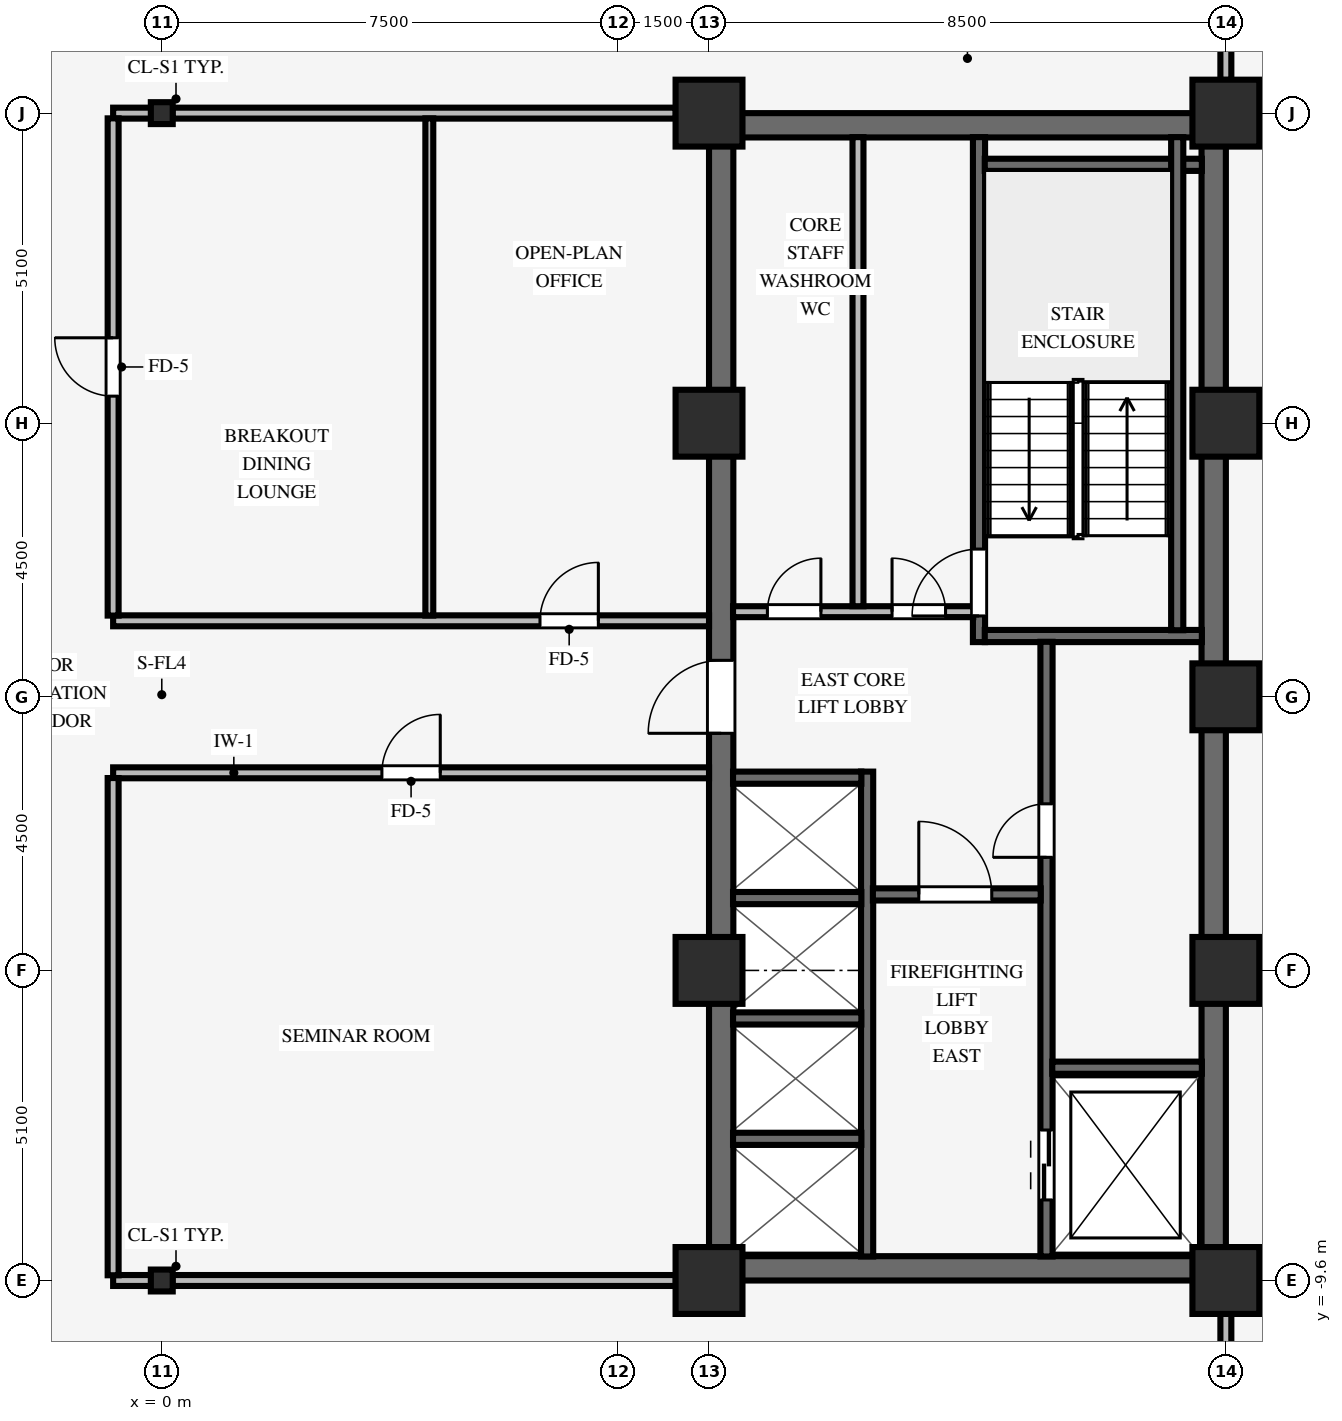
"""IFC4 building model, lengths in metres.
Left out: names, types, materials, properties, quantities, classifications, styles, units other than length and angle.
Written with IfcOpenShell. Run it as: python <this file> out.ifc"""

import sys

from ifc_helpers import new_model, si_unit, direction, frame, frame_2d, origin, origin_2d, place, context, subcontext, project, spatial, rectangle, i_section, extrude, source, transform, mapped, element, fill, save


model = new_model("IFC4")
c1 = context("Model", 3, precision=1e-05, world=origin(), true_north=direction((0.0, 1.0)))
c2 = subcontext(c1, "Body", "Model", "MODEL_VIEW")
j1 = project(units=[si_unit("LENGTHUNIT", "METRE"), si_unit("PLANEANGLEUNIT", "RADIAN")], contexts=[c1])
p1 = place(None, origin())
s1 = spatial("IfcSite", under=j1, at=p1, CompositionType="ELEMENT")
p2 = place(p1, origin())
s2 = spatial("IfcBuilding", under=s1, at=p2, CompositionType="ELEMENT")
p3 = place(p2, frame((0.0, 0.0, 105.6)))
s3 = spatial("IfcBuildingStorey", under=s2, at=p3, CompositionType="ELEMENT", Elevation=105.6)
for number, where, z_axis, x_axis in (
    (1, (9.0, -9.4, 0.0), (0.0, 0.0, 1.0), (1.0, 0.0, 0.0)),
    (2, (9.0, 9.4, 0.0), (0.0, 0.0, 1.0), (1.0, 0.0, 0.0)),
):
    element("IfcWall", number, at=place(p3, frame(where, z_axis=z_axis, x_axis=x_axis)), inside=s3, PredefinedType="SHEAR", context=c2, shape_type="SweptSolid", body=[
        extrude(rectangle(XDim=8.5, YDim=0.4, at=frame_2d((4.25, 0.0))), origin(), (0.0, 0.0, 1.0), 3.37),
    ])
p4 = place(p3, frame((9.2, -9.205, 0.0), z_axis=(0.0, 0.0, 1.0), x_axis=(0.0, 1.0, 0.0)))
e3 = element("IfcWall", 3, at=p4, inside=s3, PredefinedType="SHEAR", context=c2, shape_type="SweptSolid", body=[
    extrude(rectangle(XDim=18.41, YDim=0.4, at=frame_2d((9.205, 0.0))), origin(), (0.0, 0.0, 1.0), 3.37),
])
p5 = place(p4, frame((8.605, 0.0, 0.0)))
e4 = element("IfcOpeningElement", 4, at=p5, cuts=e3, PredefinedType="OPENING", context=c2, shape_type="SweptSolid", body=[
    extrude(rectangle(XDim=1.2, YDim=2.15, at=frame_2d((0.6, 1.075))), frame((0.0, 0.21, 0.0), z_axis=(0.0, -1.0, 0.0), x_axis=(1.0, 0.0, 0.0)), (0.0, 0.0, 1.0), 0.42),
])
p6 = place(p3, frame((17.3, -9.205, 0.0), z_axis=(0.0, 0.0, 1.0), x_axis=(0.0, 1.0, 0.0)))
e5 = element("IfcWall", 5, at=p6, inside=s3, PredefinedType="SHEAR", context=c2, shape_type="SweptSolid", body=[
    extrude(rectangle(XDim=18.41, YDim=0.4, at=frame_2d((9.205, 0.0))), origin(), (0.0, 0.0, 1.0), 3.37),
])
for number, where, z_axis, x_axis in (
    (6, (9.0, -9.6, 0.0), (0.0, 0.0, 1.0), (1.0, 0.0, 0.0)),
    (7, (9.0, -4.5, 0.0), (0.0, 0.0, 1.0), (1.0, 0.0, 0.0)),
    (8, (9.0, 4.5, 0.0), (0.0, 0.0, 1.0), (1.0, 0.0, 0.0)),
    (9, (9.0, 9.6, 0.0), (0.0, 0.0, 1.0), (1.0, 0.0, 0.0)),
    (10, (17.5, -9.6, 0.0), (0.0, 0.0, 1.0), (1.0, 0.0, 0.0)),
    (11, (17.5, -4.5, 0.0), (0.0, 0.0, 1.0), (1.0, 0.0, 0.0)),
    (12, (17.5, 4.5, 0.0), (0.0, 0.0, 1.0), (1.0, 0.0, 0.0)),
    (13, (17.5, 9.6, 0.0), (0.0, 0.0, 1.0), (1.0, 0.0, 0.0)),
    (14, (17.5, 0.0, 0.0), (0.0, 0.0, 1.0), (1.0, 0.0, 0.0)),
):
    element("IfcColumn", number, at=place(p3, frame(where, z_axis=z_axis, x_axis=x_axis)), inside=s3, PredefinedType="COLUMN", context=c2, shape_type="SweptSolid", body=[
        extrude(rectangle(XDim=1.1, YDim=1.1, at=origin_2d()), origin(), (0.0, 0.0, 1.0), 3.37),
    ])
for number, where, z_axis, x_axis in (
    (15, (0.0, -9.6, 0.0), (0.0, 0.0, 1.0), (1.0, 0.0, 0.0)),
    (16, (0.0, 9.6, 0.0), (0.0, 0.0, 1.0), (1.0, 0.0, 0.0)),
):
    element("IfcColumn", number, at=place(p3, frame(where, z_axis=z_axis, x_axis=x_axis)), inside=s3, PredefinedType="COLUMN", context=c2, shape_type="SweptSolid", body=[
        extrude(i_section(OverallWidth=0.36, OverallDepth=0.36, WebThickness=0.021, FlangeThickness=0.021, FilletRadius=0.018, at=origin_2d()), origin(), (0.0, 0.0, 1.0), 3.37),
    ])
p7 = place(p3, frame((13.44, 0.9, 0.0), z_axis=(0.0, 0.0, 1.0), x_axis=(0.0, 1.0, 0.0)))
e17 = element("IfcWall", 17, at=p7, inside=s3, PredefinedType="SHEAR", context=c2, shape_type="SweptSolid", body=[
    extrude(rectangle(XDim=8.305, YDim=0.2, at=frame_2d((4.153, 0.0))), origin(), (0.0, 0.0, 1.0), 3.37),
])
p8 = place(p7, frame((0.43, 0.0, 0.0)))
e18 = element("IfcOpeningElement", 18, at=p8, cuts=e17, PredefinedType="OPENING", context=c2, shape_type="SweptSolid", body=[
    extrude(rectangle(XDim=1.1, YDim=2.15, at=frame_2d((0.55, 1.075))), frame((0.0, 0.11, 0.0), z_axis=(0.0, -1.0, 0.0), x_axis=(1.0, 0.0, 0.0)), (0.0, 0.0, 1.0), 0.22),
])
for number, where, z_axis, x_axis in (
    (19, (13.535, 1.0, 0.0), (0.0, 0.0, 1.0), (1.0, 0.0, 0.0)),
    (20, (13.535, 8.75, 0.0), (0.0, 0.0, 1.0), (1.0, 0.0, 0.0)),
):
    element("IfcWall", number, at=place(p3, frame(where, z_axis=z_axis, x_axis=x_axis)), inside=s3, PredefinedType="SHEAR", context=c2, shape_type="SweptSolid", body=[
        extrude(rectangle(XDim=3.57, YDim=0.2, at=frame_2d((1.785, 0.0))), origin(), (0.0, 0.0, 1.0), 3.37),
    ])
p9 = place(p3, frame((16.7, 1.095, 0.0), z_axis=(0.0, 0.0, 1.0), x_axis=(0.0, 1.0, 0.0)))
e21 = element("IfcWall", 21, at=p9, inside=s3, PredefinedType="SHEAR", context=c2, shape_type="SweptSolid", body=[
    extrude(rectangle(XDim=8.11, YDim=0.2, at=frame_2d((4.055, 0.0))), origin(), (0.0, 0.0, 1.0), 3.37),
])
p10 = place(p3, frame((14.55, -9.205, 0.0), z_axis=(0.0, 0.0, 1.0), x_axis=(0.0, 1.0, 0.0)))
e22 = element("IfcWall", 22, at=p10, inside=s3, PredefinedType="SHEAR", context=c2, shape_type="SweptSolid", body=[
    extrude(rectangle(XDim=10.11, YDim=0.2, at=frame_2d((5.055, 0.0))), origin(), (0.0, 0.0, 1.0), 3.37),
])
p11 = place(p10, frame((6.565, 0.0, 0.0)))
e23 = element("IfcOpeningElement", 23, at=p11, cuts=e22, PredefinedType="OPENING", context=c2, shape_type="SweptSolid", body=[
    extrude(rectangle(XDim=0.88, YDim=2.1, at=frame_2d((0.44, 1.05))), frame((0.0, 0.11, 0.0), z_axis=(0.0, -1.0, 0.0), x_axis=(1.0, 0.0, 0.0)), (0.0, 0.0, 1.0), 0.22),
])
p12 = place(p10, frame((0.93, 0.0, 0.0)))
e24 = element("IfcOpeningElement", 24, at=p12, cuts=e22, PredefinedType="OPENING", context=c2, shape_type="SweptSolid", body=[
    extrude(rectangle(XDim=1.15, YDim=2.15, at=frame_2d((0.575, 1.075))), frame((0.0, 0.11, 0.0), z_axis=(0.0, -1.0, 0.0), x_axis=(1.0, 0.0, 0.0)), (0.0, 0.0, 1.0), 0.22),
])
p13 = place(p3, frame((14.645, -6.1, 0.0), z_axis=(0.0, 0.0, 1.0), x_axis=(1.0, 0.0, 0.0)))
e25 = element("IfcWall", 25, at=p13, inside=s3, PredefinedType="SHEAR", context=c2, shape_type="SweptSolid", body=[
    extrude(rectangle(XDim=2.46, YDim=0.2, at=frame_2d((1.23, 0.0))), origin(), (0.0, 0.0, 1.0), 3.37),
])
p14 = place(p3, frame((11.6, -9.205, 0.0), z_axis=(0.0, 0.0, 1.0), x_axis=(0.0, 1.0, 0.0)))
e26 = element("IfcWall", 26, at=p14, inside=s3, PredefinedType="SHEAR", context=c2, shape_type="SweptSolid", body=[
    extrude(rectangle(XDim=7.975, YDim=0.2, at=frame_2d((3.988, 0.0))), origin(), (0.0, 0.0, 1.0), 3.37),
])
p15 = place(p3, frame((11.695, -3.25, 0.0), z_axis=(0.0, 0.0, 1.0), x_axis=(1.0, 0.0, 0.0)))
e27 = element("IfcWall", 27, at=p15, inside=s3, PredefinedType="SHEAR", context=c2, shape_type="SweptSolid", body=[
    extrude(rectangle(XDim=2.76, YDim=0.2, at=frame_2d((1.38, 0.0))), origin(), (0.0, 0.0, 1.0), 3.37),
])
p16 = place(p15, frame((0.755, 0.0, 0.0)))
e28 = element("IfcOpeningElement", 28, at=p16, cuts=e27, PredefinedType="OPENING", context=c2, shape_type="SweptSolid", body=[
    extrude(rectangle(XDim=1.2, YDim=2.15, at=frame_2d((0.6, 1.075))), frame((0.0, 0.11, 0.0), z_axis=(0.0, -1.0, 0.0), x_axis=(1.0, 0.0, 0.0)), (0.0, 0.0, 1.0), 0.22),
])
for number, where, z_axis, x_axis in (
    (29, (9.395, -7.27, 0.0), (0.0, 0.0, 1.0), (1.0, 0.0, 0.0)),
    (30, (9.395, -5.29, 0.0), (0.0, 0.0, 1.0), (1.0, 0.0, 0.0)),
    (31, (9.395, -3.31, 0.0), (0.0, 0.0, 1.0), (1.0, 0.0, 0.0)),
    (32, (9.395, -1.33, 0.0), (0.0, 0.0, 1.0), (1.0, 0.0, 0.0)),
):
    element("IfcWall", number, at=place(p3, frame(where, z_axis=z_axis, x_axis=x_axis)), inside=s3, PredefinedType="SHEAR", context=c2, shape_type="SweptSolid", body=[
        extrude(rectangle(XDim=2.11, YDim=0.2, at=frame_2d((1.055, 0.0))), origin(), (0.0, 0.0, 1.0), 3.37),
    ])
p17 = place(p3, frame((9.395, 1.4, 0.0), z_axis=(0.0, 0.0, 1.0), x_axis=(1.0, 0.0, 0.0)))
e33 = element("IfcWall", 33, at=p17, inside=s3, PredefinedType="PARTITIONING", context=c2, shape_type="SweptSolid", body=[
    extrude(rectangle(XDim=3.95, YDim=0.18, at=frame_2d((1.975, 0.0))), origin(), (0.0, 0.0, 1.0), 3.36),
])
p18 = place(p17, frame((0.565, 0.0, 0.0)))
e34 = element("IfcOpeningElement", 34, at=p18, cuts=e33, PredefinedType="OPENING", context=c2, shape_type="SweptSolid", body=[
    extrude(rectangle(XDim=0.88, YDim=2.1, at=frame_2d((0.44, 1.05))), frame((0.0, 0.1, 0.0), z_axis=(0.0, -1.0, 0.0), x_axis=(1.0, 0.0, 0.0)), (0.0, 0.0, 1.0), 0.2),
])
p19 = place(p17, frame((2.615, 0.0, 0.0)))
e35 = element("IfcOpeningElement", 35, at=p19, cuts=e33, PredefinedType="OPENING", context=c2, shape_type="SweptSolid", body=[
    extrude(rectangle(XDim=0.88, YDim=2.1, at=frame_2d((0.44, 1.05))), frame((0.0, 0.1, 0.0), z_axis=(0.0, -1.0, 0.0), x_axis=(1.0, 0.0, 0.0)), (0.0, 0.0, 1.0), 0.2),
])
p20 = place(p3, frame((11.45, 1.49, 0.0), z_axis=(0.0, 0.0, 1.0), x_axis=(0.0, 1.0, 0.0)))
e36 = element("IfcWall", 36, at=p20, inside=s3, PredefinedType="PARTITIONING", context=c2, shape_type="SweptSolid", body=[
    extrude(rectangle(XDim=7.715, YDim=0.18, at=frame_2d((3.857, 0.0))), origin(), (0.0, 0.0, 1.0), 3.36),
])
p21 = place(p3, frame((-0.8, -9.6, 0.0), z_axis=(0.0, 0.0, 1.0), x_axis=(1.0, 0.0, 0.0)))
e37 = element("IfcWall", 37, at=p21, inside=s3, PredefinedType="PARTITIONING", context=c2, shape_type="SweptSolid", body=[
    extrude(rectangle(XDim=0.624, YDim=0.18, at=frame_2d((0.312, 0.0))), origin(), (0.0, 0.0, 1.0), 2.405),
])
p22 = place(p3, frame((0.176, -9.6, 0.0), z_axis=(0.0, 0.0, 1.0), x_axis=(1.0, 0.0, 0.0)))
e38 = element("IfcWall", 38, at=p22, inside=s3, PredefinedType="PARTITIONING", context=c2, shape_type="SweptSolid", body=[
    extrude(rectangle(XDim=8.278, YDim=0.18, at=frame_2d((4.139, 0.0))), origin(), (0.0, 0.0, 1.0), 2.405),
])
p23 = place(p3, frame((-0.8, -1.25, 0.0), z_axis=(0.0, 0.0, 1.0), x_axis=(1.0, 0.0, 0.0)))
e39 = element("IfcWall", 39, at=p23, inside=s3, PredefinedType="PARTITIONING", context=c2, shape_type="SweptSolid", body=[
    extrude(rectangle(XDim=9.8, YDim=0.18, at=frame_2d((4.9, 0.0))), origin(), (0.0, 0.0, 1.0), 3.36),
])
p24 = place(p23, frame((4.42, 0.0, 0.0)))
e40 = element("IfcOpeningElement", 40, at=p24, cuts=e39, PredefinedType="OPENING", context=c2, shape_type="SweptSolid", body=[
    extrude(rectangle(XDim=0.96, YDim=2.1, at=frame_2d((0.48, 1.05))), frame((0.0, 0.1, 0.0), z_axis=(0.0, -1.0, 0.0), x_axis=(1.0, 0.0, 0.0)), (0.0, 0.0, 1.0), 0.2),
])
p25 = place(p3, frame((-0.8, 1.25, 0.0), z_axis=(0.0, 0.0, 1.0), x_axis=(1.0, 0.0, 0.0)))
e41 = element("IfcWall", 41, at=p25, inside=s3, PredefinedType="PARTITIONING", context=c2, shape_type="SweptSolid", body=[
    extrude(rectangle(XDim=9.8, YDim=0.18, at=frame_2d((4.9, 0.0))), origin(), (0.0, 0.0, 1.0), 3.36),
])
p26 = place(p25, frame((7.02, 0.0, 0.0)))
e42 = element("IfcOpeningElement", 42, at=p26, cuts=e41, PredefinedType="OPENING", context=c2, shape_type="SweptSolid", body=[
    extrude(rectangle(XDim=0.96, YDim=2.1, at=frame_2d((0.48, 1.05))), frame((0.0, 0.1, 0.0), z_axis=(0.0, -1.0, 0.0), x_axis=(1.0, 0.0, 0.0)), (0.0, 0.0, 1.0), 0.2),
])
p27 = place(p3, frame((-0.8, 9.6, 0.0), z_axis=(0.0, 0.0, 1.0), x_axis=(1.0, 0.0, 0.0)))
e43 = element("IfcWall", 43, at=p27, inside=s3, PredefinedType="PARTITIONING", context=c2, shape_type="SweptSolid", body=[
    extrude(rectangle(XDim=0.624, YDim=0.18, at=frame_2d((0.312, 0.0))), origin(), (0.0, 0.0, 1.0), 2.405),
])
p28 = place(p3, frame((0.176, 9.6, 0.0), z_axis=(0.0, 0.0, 1.0), x_axis=(1.0, 0.0, 0.0)))
e44 = element("IfcWall", 44, at=p28, inside=s3, PredefinedType="PARTITIONING", context=c2, shape_type="SweptSolid", body=[
    extrude(rectangle(XDim=8.278, YDim=0.18, at=frame_2d((4.139, 0.0))), origin(), (0.0, 0.0, 1.0), 2.405),
])
p29 = place(p3, frame((-0.8, -9.514, 0.0), z_axis=(0.0, 0.0, 1.0), x_axis=(0.0, 1.0, 0.0)))
e45 = element("IfcWall", 45, at=p29, inside=s3, PredefinedType="PARTITIONING", context=c2, shape_type="SweptSolid", body=[
    extrude(rectangle(XDim=8.178, YDim=0.18, at=frame_2d((4.089, 0.0))), origin(), (0.0, 0.0, 1.0), 3.36),
])
p30 = place(p3, frame((-0.8, 1.336, 0.0), z_axis=(0.0, 0.0, 1.0), x_axis=(0.0, 1.0, 0.0)))
e46 = element("IfcWall", 46, at=p30, inside=s3, PredefinedType="PARTITIONING", context=c2, shape_type="SweptSolid", body=[
    extrude(rectangle(XDim=8.178, YDim=0.18, at=frame_2d((4.089, 0.0))), origin(), (0.0, 0.0, 1.0), 3.36),
])
p31 = place(p30, frame((3.609, 0.0, 0.0)))
e47 = element("IfcOpeningElement", 47, at=p31, cuts=e46, PredefinedType="OPENING", context=c2, shape_type="SweptSolid", body=[
    extrude(rectangle(XDim=0.96, YDim=2.1, at=frame_2d((0.48, 1.05))), frame((0.0, 0.1, 0.0), z_axis=(0.0, -1.0, 0.0), x_axis=(1.0, 0.0, 0.0)), (0.0, 0.0, 1.0), 0.2),
])
p32 = place(p3, frame((4.4, 1.336, 0.0), z_axis=(0.0, 0.0, 1.0), x_axis=(0.0, 1.0, 0.0)))
e48 = element("IfcWall", 48, at=p32, inside=s3, PredefinedType="PARTITIONING", context=c2, shape_type="SweptSolid", body=[
    extrude(rectangle(XDim=8.178, YDim=0.13, at=frame_2d((4.089, 0.0))), origin(), (0.0, 0.0, 1.0), 3.36),
])
for number, where, z_axis, x_axis in (
    (49, (17.5, -11.114, 0.0), (0.0, 0.0, 1.0), (0.0, 1.0, 0.0)),
    (50, (17.5, 10.146, 0.0), (0.0, 0.0, 1.0), (0.0, 1.0, 0.0)),
):
    element("IfcWall", number, at=place(p3, frame(where, z_axis=z_axis, x_axis=x_axis)), inside=s3, PredefinedType="PARTITIONING", context=c2, shape_type="SweptSolid", body=[
        extrude(rectangle(XDim=0.968, YDim=0.18, at=frame_2d((0.484, 0.0))), origin(), (0.0, 0.0, 1.0), 2.738),
    ])
m1 = source(origin(), c2, "Body", "SweptSolid", [
    extrude(rectangle(XDim=1.1, YDim=2.15, at=frame_2d((0.55, 1.075))), frame((0.0, 0.025, 0.0), z_axis=(0.0, -1.0, 0.0), x_axis=(1.0, 0.0, 0.0)), (0.0, 0.0, 1.0), 0.05),
])
p33 = place(p8, origin())
e51 = element("IfcDoor", 51, at=p33, inside=s3, OperationType="SINGLE_SWING_LEFT", PredefinedType="DOOR", context=c2, shape_type="MappedRepresentation", body=[
    mapped(m1, transform((0.0, 0.0, 0.0), scale=1.0)),
])
fill(e18, e51)
m2 = source(origin(), c2, "Body", "SweptSolid", [
    extrude(rectangle(XDim=0.88, YDim=2.1, at=frame_2d((0.44, 1.05))), frame((0.0, 0.025, 0.0), z_axis=(0.0, -1.0, 0.0), x_axis=(1.0, 0.0, 0.0)), (0.0, 0.0, 1.0), 0.05),
])
p34 = place(p11, origin())
e52 = element("IfcDoor", 52, at=p34, inside=s3, OperationType="SINGLE_SWING_LEFT", PredefinedType="DOOR", context=c2, shape_type="MappedRepresentation", body=[
    mapped(m2, transform((0.0, 0.0, 0.0), scale=1.0)),
])
fill(e23, e52)
m3 = source(origin(), c2, "Body", "SweptSolid", [
    extrude(rectangle(XDim=1.2, YDim=2.15, at=frame_2d((0.6, 1.075))), frame((0.0, 0.025, 0.0), z_axis=(0.0, -1.0, 0.0), x_axis=(1.0, 0.0, 0.0)), (0.0, 0.0, 1.0), 0.05),
])
p35 = place(p16, origin())
e53 = element("IfcDoor", 53, at=p35, inside=s3, OperationType="SINGLE_SWING_LEFT", PredefinedType="DOOR", context=c2, shape_type="MappedRepresentation", body=[
    mapped(m3, transform((0.0, 0.0, 0.0), scale=1.0)),
])
fill(e28, e53)
p36 = place(p5, origin())
e54 = element("IfcDoor", 54, at=p36, inside=s3, OperationType="SINGLE_SWING_LEFT", PredefinedType="DOOR", context=c2, shape_type="MappedRepresentation", body=[
    mapped(m3, transform((0.0, 0.0, 0.0), scale=1.0)),
])
fill(e4, e54)
p37 = place(p18, origin())
e55 = element("IfcDoor", 55, at=p37, inside=s3, OperationType="SINGLE_SWING_RIGHT", PredefinedType="DOOR", context=c2, shape_type="MappedRepresentation", body=[
    mapped(m2, transform((0.0, 0.0, 0.0), scale=1.0)),
])
fill(e34, e55)
p38 = place(p19, origin())
e56 = element("IfcDoor", 56, at=p38, inside=s3, OperationType="SINGLE_SWING_LEFT", PredefinedType="DOOR", context=c2, shape_type="MappedRepresentation", body=[
    mapped(m2, transform((0.0, 0.0, 0.0), scale=1.0)),
])
fill(e35, e56)
m4 = source(origin(), c2, "Body", "SweptSolid", [
    extrude(rectangle(XDim=1.15, YDim=2.15, at=frame_2d((0.575, 1.075))), frame((0.0, 0.025, 0.0), z_axis=(0.0, -1.0, 0.0), x_axis=(1.0, 0.0, 0.0)), (0.0, 0.0, 1.0), 0.05),
])
p39 = place(p12, origin())
e57 = element("IfcDoor", 57, at=p39, inside=s3, OperationType="DOUBLE_DOOR_SLIDING", PredefinedType="DOOR", context=c2, shape_type="MappedRepresentation", body=[
    mapped(m4, transform((0.0, 0.0, 0.0), scale=1.0)),
])
fill(e24, e57)
m5 = source(origin(), c2, "Body", "SweptSolid", [
    extrude(rectangle(XDim=0.96, YDim=2.1, at=frame_2d((0.48, 1.05))), frame((0.0, 0.025, 0.0), z_axis=(0.0, -1.0, 0.0), x_axis=(1.0, 0.0, 0.0)), (0.0, 0.0, 1.0), 0.05),
])
p40 = place(p24, origin())
e58 = element("IfcDoor", 58, at=p40, inside=s3, OperationType="SINGLE_SWING_RIGHT", PredefinedType="DOOR", context=c2, shape_type="MappedRepresentation", body=[
    mapped(m5, transform((0.0, 0.0, 0.0), scale=1.0)),
])
fill(e40, e58)
p41 = place(p31, origin())
e59 = element("IfcDoor", 59, at=p41, inside=s3, OperationType="SINGLE_SWING_RIGHT", PredefinedType="DOOR", context=c2, shape_type="MappedRepresentation", body=[
    mapped(m5, transform((0.0, 0.0, 0.0), scale=1.0)),
])
fill(e47, e59)
p42 = place(p26, origin())
e60 = element("IfcDoor", 60, at=p42, inside=s3, OperationType="SINGLE_SWING_RIGHT", PredefinedType="DOOR", context=c2, shape_type="MappedRepresentation", body=[
    mapped(m5, transform((0.0, 0.0, 0.0), scale=1.0)),
])
fill(e42, e60)
save(model, sys.argv[1])
